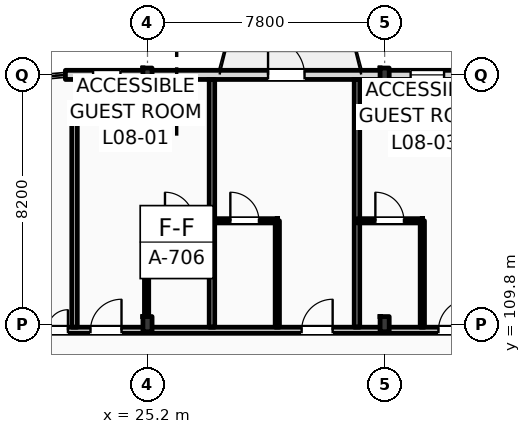
"""IFC4 building model, lengths in metres.
Left out: names, types, materials, properties, quantities, classifications, styles, units other than length and angle.
Written with IfcOpenShell. Run it as: python <this file> out.ifc"""

import sys

from ifc_helpers import new_model, si_unit, direction, frame, frame_2d, origin, origin_2d, place, context, subcontext, project, spatial, rectangle, i_section, extrude, element, fill, save


model = new_model("IFC4")
c1 = context("Model", 3, precision=1e-05, world=origin(), true_north=direction((0.0, 1.0)))
c2 = subcontext(c1, "Body", "Model", "MODEL_VIEW")
j1 = project(units=[si_unit("LENGTHUNIT", "METRE"), si_unit("PLANEANGLEUNIT", "RADIAN")], contexts=[c1])
p1 = place(None, origin())
s1 = spatial("IfcSite", under=j1, at=p1, CompositionType="ELEMENT")
p2 = place(p1, origin())
s2 = spatial("IfcBuilding", under=s1, at=p2, CompositionType="ELEMENT")
p3 = place(p2, frame((0.0, 0.0, 35.4)))
s3 = spatial("IfcBuildingStorey", under=s2, at=p3, CompositionType="ELEMENT", Elevation=35.4)
p4 = place(p3, frame((25.2, 109.8, 0.0), z_axis=(0.0, 0.0, 1.0), x_axis=(1.0, 0.0, 0.0)))
e1 = element("IfcColumn", 1, at=p4, inside=s3, PredefinedType="COLUMN", context=c2, shape_type="SweptSolid", body=[
    extrude(i_section(OverallWidth=0.3, OverallDepth=0.5, WebThickness=0.014, FlangeThickness=0.028, FilletRadius=0.027, at=origin_2d()), origin(), (0.0, 0.0, 1.0), 3.6),
])
p5 = place(p3, frame((25.2, 118.0, 0.0), z_axis=(0.0, 0.0, 1.0), x_axis=(1.0, 0.0, 0.0)))
e2 = element("IfcColumn", 2, at=p5, inside=s3, PredefinedType="COLUMN", context=c2, shape_type="SweptSolid", body=[
    extrude(i_section(OverallWidth=0.3, OverallDepth=0.45, WebThickness=0.014, FlangeThickness=0.026, FilletRadius=0.027, at=origin_2d()), origin(), (0.0, 0.0, 1.0), 3.6),
])
p6 = place(p3, frame((33.0, 109.8, 0.0), z_axis=(0.0, 0.0, 1.0), x_axis=(1.0, 0.0, 0.0)))
e3 = element("IfcColumn", 3, at=p6, inside=s3, PredefinedType="COLUMN", context=c2, shape_type="SweptSolid", body=[
    extrude(i_section(OverallWidth=0.3, OverallDepth=0.5, WebThickness=0.014, FlangeThickness=0.028, FilletRadius=0.027, at=origin_2d()), origin(), (0.0, 0.0, 1.0), 3.6),
])
p7 = place(p3, frame((33.0, 118.0, 0.0), z_axis=(0.0, 0.0, 1.0), x_axis=(1.0, 0.0, 0.0)))
e4 = element("IfcColumn", 4, at=p7, inside=s3, PredefinedType="COLUMN", context=c2, shape_type="SweptSolid", body=[
    extrude(i_section(OverallWidth=0.3, OverallDepth=0.45, WebThickness=0.014, FlangeThickness=0.026, FilletRadius=0.027, at=origin_2d()), origin(), (0.0, 0.0, 1.0), 3.6),
])
p8 = place(p3, frame((22.5, 118.0, 0.0), z_axis=(0.0, 0.0, 1.0), x_axis=(1.0, 0.0, 0.0)))
e5 = element("IfcWall", 5, at=p8, inside=s3, PredefinedType="STANDARD", context=c2, shape_type="SweptSolid", body=[
    extrude(rectangle(XDim=72.9, YDim=0.3, at=frame_2d((36.45, 0.0))), origin(), (0.0, 0.0, 1.0), 2.92),
])
p9 = place(p8, frame((0.91, 0.0, 0.9)))
e6 = element("IfcOpeningElement", 6, at=p9, cuts=e5, PredefinedType="OPENING", context=c2, shape_type="SweptSolid", body=[
    extrude(rectangle(XDim=0.9, YDim=1.84, at=frame_2d((0.45, 0.92))), frame((0.0, 0.16, 0.0), z_axis=(0.0, -1.0, 0.0), x_axis=(1.0, 0.0, 0.0)), (0.0, 0.0, 1.0), 0.32),
])
p10 = place(p8, frame((6.665, 0.0, 0.0)))
e7 = element("IfcOpeningElement", 7, at=p10, cuts=e5, PredefinedType="OPENING", context=c2, shape_type="SweptSolid", body=[
    extrude(rectangle(XDim=1.2, YDim=2.25, at=frame_2d((0.6, 1.125))), frame((0.0, 0.16, 0.0), z_axis=(0.0, -1.0, 0.0), x_axis=(1.0, 0.0, 0.0)), (0.0, 0.0, 1.0), 0.32),
])
p11 = place(p8, frame((11.355, 0.0, 0.9)))
e8 = element("IfcOpeningElement", 8, at=p11, cuts=e5, PredefinedType="OPENING", context=c2, shape_type="SweptSolid", body=[
    extrude(rectangle(XDim=1.1, YDim=1.5, at=frame_2d((0.55, 0.75))), frame((0.0, 0.16, 0.0), z_axis=(0.0, -1.0, 0.0), x_axis=(1.0, 0.0, 0.0)), (0.0, 0.0, 1.0), 0.32),
])
p12 = place(p8, frame((15.58, 0.0, 0.9)))
e9 = element("IfcOpeningElement", 9, at=p12, cuts=e5, PredefinedType="OPENING", context=c2, shape_type="SweptSolid", body=[
    extrude(rectangle(XDim=1.25, YDim=1.6, at=frame_2d((0.625, 0.8))), frame((0.0, 0.16, 0.0), z_axis=(0.0, -1.0, 0.0), x_axis=(1.0, 0.0, 0.0)), (0.0, 0.0, 1.0), 0.32),
])
p13 = place(p8, frame((21.08, 0.0, 0.0)))
e10 = element("IfcOpeningElement", 10, at=p13, cuts=e5, PredefinedType="OPENING", context=c2, shape_type="SweptSolid", body=[
    extrude(rectangle(XDim=1.2, YDim=2.25, at=frame_2d((0.6, 1.125))), frame((0.0, 0.16, 0.0), z_axis=(0.0, -1.0, 0.0), x_axis=(1.0, 0.0, 0.0)), (0.0, 0.0, 1.0), 0.32),
])
p14 = place(p8, frame((23.54, 0.0, 0.0)))
e11 = element("IfcOpeningElement", 11, at=p14, cuts=e5, PredefinedType="OPENING", context=c2, shape_type="SweptSolid", body=[
    extrude(rectangle(XDim=1.2, YDim=2.25, at=frame_2d((0.6, 1.125))), frame((0.0, 0.16, 0.0), z_axis=(0.0, -1.0, 0.0), x_axis=(1.0, 0.0, 0.0)), (0.0, 0.0, 1.0), 0.32),
])
p15 = place(p8, frame((28.83, 0.0, 0.9)))
e12 = element("IfcOpeningElement", 12, at=p15, cuts=e5, PredefinedType="OPENING", context=c2, shape_type="SweptSolid", body=[
    extrude(rectangle(XDim=1.75, YDim=1.84, at=frame_2d((0.875, 0.92))), frame((0.0, 0.16, 0.0), z_axis=(0.0, -1.0, 0.0), x_axis=(1.0, 0.0, 0.0)), (0.0, 0.0, 1.0), 0.32),
])
p16 = place(p8, frame((34.805, 0.0, 0.9)))
e13 = element("IfcOpeningElement", 13, at=p16, cuts=e5, PredefinedType="OPENING", context=c2, shape_type="SweptSolid", body=[
    extrude(rectangle(XDim=1.35, YDim=1.84, at=frame_2d((0.675, 0.92))), frame((0.0, 0.16, 0.0), z_axis=(0.0, -1.0, 0.0), x_axis=(1.0, 0.0, 0.0)), (0.0, 0.0, 1.0), 0.32),
])
p17 = place(p8, frame((38.105, 0.0, 0.0)))
e14 = element("IfcOpeningElement", 14, at=p17, cuts=e5, PredefinedType="OPENING", context=c2, shape_type="SweptSolid", body=[
    extrude(rectangle(XDim=1.2, YDim=2.25, at=frame_2d((0.6, 1.125))), frame((0.0, 0.16, 0.0), z_axis=(0.0, -1.0, 0.0), x_axis=(1.0, 0.0, 0.0)), (0.0, 0.0, 1.0), 0.32),
])
p18 = place(p8, frame((42.505, 0.0, 0.9)))
e15 = element("IfcOpeningElement", 15, at=p18, cuts=e5, PredefinedType="OPENING", context=c2, shape_type="SweptSolid", body=[
    extrude(rectangle(XDim=2.6, YDim=1.84, at=frame_2d((1.3, 0.92))), frame((0.0, 0.16, 0.0), z_axis=(0.0, -1.0, 0.0), x_axis=(1.0, 0.0, 0.0)), (0.0, 0.0, 1.0), 0.32),
])
p19 = place(p8, frame((46.2, 0.0, 0.9)))
e16 = element("IfcOpeningElement", 16, at=p19, cuts=e5, PredefinedType="OPENING", context=c2, shape_type="SweptSolid", body=[
    extrude(rectangle(XDim=1.8, YDim=1.84, at=frame_2d((0.9, 0.92))), frame((0.0, 0.16, 0.0), z_axis=(0.0, -1.0, 0.0), x_axis=(1.0, 0.0, 0.0)), (0.0, 0.0, 1.0), 0.32),
])
p20 = place(p8, frame((52.565, 0.0, 0.0)))
e17 = element("IfcOpeningElement", 17, at=p20, cuts=e5, PredefinedType="OPENING", context=c2, shape_type="SweptSolid", body=[
    extrude(rectangle(XDim=1.2, YDim=2.25, at=frame_2d((0.6, 1.125))), frame((0.0, 0.16, 0.0), z_axis=(0.0, -1.0, 0.0), x_axis=(1.0, 0.0, 0.0)), (0.0, 0.0, 1.0), 0.32),
])
p21 = place(p8, frame((55.305, 0.0, 0.9)))
e18 = element("IfcOpeningElement", 18, at=p21, cuts=e5, PredefinedType="OPENING", context=c2, shape_type="SweptSolid", body=[
    extrude(rectangle(XDim=1.2, YDim=1.8, at=frame_2d((0.6, 0.9))), frame((0.0, 0.16, 0.0), z_axis=(0.0, -1.0, 0.0), x_axis=(1.0, 0.0, 0.0)), (0.0, 0.0, 1.0), 0.32),
])
p22 = place(p8, frame((60.53, 0.0, 0.9)))
e19 = element("IfcOpeningElement", 19, at=p22, cuts=e5, PredefinedType="OPENING", context=c2, shape_type="SweptSolid", body=[
    extrude(rectangle(XDim=1.35, YDim=1.84, at=frame_2d((0.675, 0.92))), frame((0.0, 0.16, 0.0), z_axis=(0.0, -1.0, 0.0), x_axis=(1.0, 0.0, 0.0)), (0.0, 0.0, 1.0), 0.32),
])
p23 = place(p8, frame((65.955, 0.0, 0.9)))
e20 = element("IfcOpeningElement", 20, at=p23, cuts=e5, PredefinedType="OPENING", context=c2, shape_type="SweptSolid", body=[
    extrude(rectangle(XDim=1.35, YDim=1.84, at=frame_2d((0.675, 0.92))), frame((0.0, 0.16, 0.0), z_axis=(0.0, -1.0, 0.0), x_axis=(1.0, 0.0, 0.0)), (0.0, 0.0, 1.0), 0.32),
])
p24 = place(p8, frame((69.335, 0.0, 0.9)))
e21 = element("IfcOpeningElement", 21, at=p24, cuts=e5, PredefinedType="OPENING", context=c2, shape_type="SweptSolid", body=[
    extrude(rectangle(XDim=1.65, YDim=1.84, at=frame_2d((0.825, 0.92))), frame((0.0, 0.16, 0.0), z_axis=(0.0, -1.0, 0.0), x_axis=(1.0, 0.0, 0.0)), (0.0, 0.0, 1.0), 0.32),
])
p25 = place(p3, frame((10.65, 109.6, 0.0), z_axis=(0.0, 0.0, 1.0), x_axis=(1.0, 0.0, 0.0)))
e22 = element("IfcWall", 22, at=p25, inside=s3, PredefinedType="PARTITIONING", context=c2, shape_type="SweptSolid", body=[
    extrude(rectangle(XDim=84.61, YDim=0.2, at=frame_2d((42.305, 0.0))), origin(), (0.0, 0.0, 1.0), 2.82),
])
p26 = place(p25, frame((12.675, 0.0, 0.0)))
e23 = element("IfcOpeningElement", 23, at=p26, cuts=e22, PredefinedType="OPENING", context=c2, shape_type="SweptSolid", body=[
    extrude(rectangle(XDim=1.02, YDim=2.2, at=frame_2d((0.51, 1.1))), frame((0.0, 0.11, 0.0), z_axis=(0.0, -1.0, 0.0), x_axis=(1.0, 0.0, 0.0)), (0.0, 0.0, 1.0), 0.22),
])
p27 = place(p25, frame((19.62, 0.0, 0.0)))
e24 = element("IfcOpeningElement", 24, at=p27, cuts=e22, PredefinedType="OPENING", context=c2, shape_type="SweptSolid", body=[
    extrude(rectangle(XDim=1.02, YDim=2.2, at=frame_2d((0.51, 1.1))), frame((0.0, 0.11, 0.0), z_axis=(0.0, -1.0, 0.0), x_axis=(1.0, 0.0, 0.0)), (0.0, 0.0, 1.0), 0.22),
])
p28 = place(p25, frame((24.12, 0.0, 0.0)))
e25 = element("IfcOpeningElement", 25, at=p28, cuts=e22, PredefinedType="OPENING", context=c2, shape_type="SweptSolid", body=[
    extrude(rectangle(XDim=1.02, YDim=2.2, at=frame_2d((0.51, 1.1))), frame((0.0, 0.11, 0.0), z_axis=(0.0, -1.0, 0.0), x_axis=(1.0, 0.0, 0.0)), (0.0, 0.0, 1.0), 0.22),
])
p29 = place(p25, frame((26.47, 0.0, 0.0)))
e26 = element("IfcOpeningElement", 26, at=p29, cuts=e22, PredefinedType="OPENING", context=c2, shape_type="SweptSolid", body=[
    extrude(rectangle(XDim=1.02, YDim=2.2, at=frame_2d((0.51, 1.1))), frame((0.0, 0.11, 0.0), z_axis=(0.0, -1.0, 0.0), x_axis=(1.0, 0.0, 0.0)), (0.0, 0.0, 1.0), 0.22),
])
p30 = place(p25, frame((33.15, 0.0, 0.0)))
e27 = element("IfcOpeningElement", 27, at=p30, cuts=e22, PredefinedType="OPENING", context=c2, shape_type="SweptSolid", body=[
    extrude(rectangle(XDim=0.96, YDim=2.2, at=frame_2d((0.48, 1.1))), frame((0.0, 0.11, 0.0), z_axis=(0.0, -1.0, 0.0), x_axis=(1.0, 0.0, 0.0)), (0.0, 0.0, 1.0), 0.22),
])
p31 = place(p25, frame((35.5, 0.0, 0.0)))
e28 = element("IfcOpeningElement", 28, at=p31, cuts=e22, PredefinedType="OPENING", context=c2, shape_type="SweptSolid", body=[
    extrude(rectangle(XDim=0.96, YDim=2.2, at=frame_2d((0.48, 1.1))), frame((0.0, 0.11, 0.0), z_axis=(0.0, -1.0, 0.0), x_axis=(1.0, 0.0, 0.0)), (0.0, 0.0, 1.0), 0.22),
])
p32 = place(p25, frame((42.15, 0.0, 0.0)))
e29 = element("IfcOpeningElement", 29, at=p32, cuts=e22, PredefinedType="OPENING", context=c2, shape_type="SweptSolid", body=[
    extrude(rectangle(XDim=0.96, YDim=2.2, at=frame_2d((0.48, 1.1))), frame((0.0, 0.11, 0.0), z_axis=(0.0, -1.0, 0.0), x_axis=(1.0, 0.0, 0.0)), (0.0, 0.0, 1.0), 0.22),
])
p33 = place(p25, frame((47.15, 0.0, 0.0)))
e30 = element("IfcOpeningElement", 30, at=p33, cuts=e22, PredefinedType="OPENING", context=c2, shape_type="SweptSolid", body=[
    extrude(rectangle(XDim=0.96, YDim=2.2, at=frame_2d((0.48, 1.1))), frame((0.0, 0.11, 0.0), z_axis=(0.0, -1.0, 0.0), x_axis=(1.0, 0.0, 0.0)), (0.0, 0.0, 1.0), 0.22),
])
p34 = place(p25, frame((51.15, 0.0, 0.0)))
e31 = element("IfcOpeningElement", 31, at=p34, cuts=e22, PredefinedType="OPENING", context=c2, shape_type="SweptSolid", body=[
    extrude(rectangle(XDim=0.96, YDim=2.2, at=frame_2d((0.48, 1.1))), frame((0.0, 0.11, 0.0), z_axis=(0.0, -1.0, 0.0), x_axis=(1.0, 0.0, 0.0)), (0.0, 0.0, 1.0), 0.22),
])
p35 = place(p25, frame((55.65, 0.0, 0.0)))
e32 = element("IfcOpeningElement", 32, at=p35, cuts=e22, PredefinedType="OPENING", context=c2, shape_type="SweptSolid", body=[
    extrude(rectangle(XDim=0.96, YDim=2.2, at=frame_2d((0.48, 1.1))), frame((0.0, 0.11, 0.0), z_axis=(0.0, -1.0, 0.0), x_axis=(1.0, 0.0, 0.0)), (0.0, 0.0, 1.0), 0.22),
])
p36 = place(p25, frame((58.0, 0.0, 0.0)))
e33 = element("IfcOpeningElement", 33, at=p36, cuts=e22, PredefinedType="OPENING", context=c2, shape_type="SweptSolid", body=[
    extrude(rectangle(XDim=0.96, YDim=2.2, at=frame_2d((0.48, 1.1))), frame((0.0, 0.11, 0.0), z_axis=(0.0, -1.0, 0.0), x_axis=(1.0, 0.0, 0.0)), (0.0, 0.0, 1.0), 0.22),
])
p37 = place(p25, frame((64.65, 0.0, 0.0)))
e34 = element("IfcOpeningElement", 34, at=p37, cuts=e22, PredefinedType="OPENING", context=c2, shape_type="SweptSolid", body=[
    extrude(rectangle(XDim=0.96, YDim=2.2, at=frame_2d((0.48, 1.1))), frame((0.0, 0.11, 0.0), z_axis=(0.0, -1.0, 0.0), x_axis=(1.0, 0.0, 0.0)), (0.0, 0.0, 1.0), 0.22),
])
p38 = place(p25, frame((66.75, 0.0, 0.0)))
e35 = element("IfcOpeningElement", 35, at=p38, cuts=e22, PredefinedType="OPENING", context=c2, shape_type="SweptSolid", body=[
    extrude(rectangle(XDim=0.96, YDim=2.2, at=frame_2d((0.48, 1.1))), frame((0.0, 0.11, 0.0), z_axis=(0.0, -1.0, 0.0), x_axis=(1.0, 0.0, 0.0)), (0.0, 0.0, 1.0), 0.22),
])
p39 = place(p25, frame((73.65, 0.0, 0.0)))
e36 = element("IfcOpeningElement", 36, at=p39, cuts=e22, PredefinedType="OPENING", context=c2, shape_type="SweptSolid", body=[
    extrude(rectangle(XDim=0.96, YDim=2.2, at=frame_2d((0.48, 1.1))), frame((0.0, 0.11, 0.0), z_axis=(0.0, -1.0, 0.0), x_axis=(1.0, 0.0, 0.0)), (0.0, 0.0, 1.0), 0.22),
])
p40 = place(p25, frame((78.4, 0.0, 0.0)))
e37 = element("IfcOpeningElement", 37, at=p40, cuts=e22, PredefinedType="OPENING", context=c2, shape_type="SweptSolid", body=[
    extrude(rectangle(XDim=0.96, YDim=2.2, at=frame_2d((0.48, 1.1))), frame((0.0, 0.11, 0.0), z_axis=(0.0, -1.0, 0.0), x_axis=(1.0, 0.0, 0.0)), (0.0, 0.0, 1.0), 0.22),
])
p41 = place(p25, frame((80.455, 0.0, 0.0)))
e38 = element("IfcOpeningElement", 38, at=p41, cuts=e22, PredefinedType="OPENING", context=c2, shape_type="SweptSolid", body=[
    extrude(rectangle(XDim=0.96, YDim=2.2, at=frame_2d((0.48, 1.1))), frame((0.0, 0.11, 0.0), z_axis=(0.0, -1.0, 0.0), x_axis=(1.0, 0.0, 0.0)), (0.0, 0.0, 1.0), 0.22),
])
p42 = place(p25, frame((2.716, 0.0, 0.0)))
e39 = element("IfcOpeningElement", 39, at=p42, cuts=e22, PredefinedType="OPENING", context=c2, shape_type="SweptSolid", body=[
    extrude(rectangle(XDim=1.35, YDim=2.25, at=frame_2d((0.675, 1.125))), frame((0.0, 0.11, 0.0), z_axis=(0.0, -1.0, 0.0), x_axis=(1.0, 0.0, 0.0)), (0.0, 0.0, 1.0), 0.22),
])
p43 = place(p25, frame((6.65, 0.0, 0.0)))
e40 = element("IfcOpeningElement", 40, at=p43, cuts=e22, PredefinedType="OPENING", context=c2, shape_type="SweptSolid", body=[
    extrude(rectangle(XDim=1.35, YDim=2.25, at=frame_2d((0.675, 1.125))), frame((0.0, 0.11, 0.0), z_axis=(0.0, -1.0, 0.0), x_axis=(1.0, 0.0, 0.0)), (0.0, 0.0, 1.0), 0.22),
])
p44 = place(p25, frame((10.583, 0.0, 0.0)))
e41 = element("IfcOpeningElement", 41, at=p44, cuts=e22, PredefinedType="OPENING", context=c2, shape_type="SweptSolid", body=[
    extrude(rectangle(XDim=1.35, YDim=2.25, at=frame_2d((0.675, 1.125))), frame((0.0, 0.11, 0.0), z_axis=(0.0, -1.0, 0.0), x_axis=(1.0, 0.0, 0.0)), (0.0, 0.0, 1.0), 0.22),
])
p45 = place(p3, frame((27.32, 109.7, 0.0), z_axis=(0.0, 0.0, 1.0), x_axis=(0.0, 1.0, 0.0)))
e42 = element("IfcWall", 42, at=p45, inside=s3, PredefinedType="PARTITIONING", context=c2, shape_type="SweptSolid", body=[
    extrude(rectangle(XDim=8.15, YDim=0.18, at=frame_2d((4.075, 0.0))), origin(), (0.0, 0.0, 1.0), 3.38),
])
p46 = place(p3, frame((25.17, 109.7, 0.0), z_axis=(0.0, 0.0, 1.0), x_axis=(0.0, 1.0, 0.0)))
e43 = element("IfcWall", 43, at=p46, inside=s3, PredefinedType="PARTITIONING", context=c2, shape_type="SweptSolid", body=[
    extrude(rectangle(XDim=3.5, YDim=0.14, at=frame_2d((1.75, 0.0))), origin(), (0.0, 0.0, 1.0), 3.01),
])
p47 = place(p3, frame((25.17, 113.2, 0.0), z_axis=(0.0, 0.0, 1.0), x_axis=(1.0, 0.0, 0.0)))
e44 = element("IfcWall", 44, at=p47, inside=s3, PredefinedType="PARTITIONING", context=c2, shape_type="SweptSolid", body=[
    extrude(rectangle(XDim=2.15, YDim=0.14, at=frame_2d((1.075, 0.0))), origin(), (0.0, 0.0, 1.0), 3.38),
])
p48 = place(p47, frame((0.605, 0.0, 0.0)))
e45 = element("IfcOpeningElement", 45, at=p48, cuts=e44, PredefinedType="OPENING", context=c2, shape_type="SweptSolid", body=[
    extrude(rectangle(XDim=0.94, YDim=2.15, at=frame_2d((0.47, 1.075))), frame((0.0, 0.08, 0.0), z_axis=(0.0, -1.0, 0.0), x_axis=(1.0, 0.0, 0.0)), (0.0, 0.0, 1.0), 0.16),
])
p49 = place(p3, frame((32.09, 109.7, 0.0), z_axis=(0.0, 0.0, 1.0), x_axis=(0.0, 1.0, 0.0)))
e46 = element("IfcWall", 46, at=p49, inside=s3, PredefinedType="PARTITIONING", context=c2, shape_type="SweptSolid", body=[
    extrude(rectangle(XDim=8.15, YDim=0.18, at=frame_2d((4.075, 0.0))), origin(), (0.0, 0.0, 1.0), 3.38),
])
p50 = place(p3, frame((29.47, 109.7, 0.0), z_axis=(0.0, 0.0, 1.0), x_axis=(0.0, 1.0, 0.0)))
e47 = element("IfcWall", 47, at=p50, inside=s3, PredefinedType="PARTITIONING", context=c2, shape_type="SweptSolid", body=[
    extrude(rectangle(XDim=3.5, YDim=0.14, at=frame_2d((1.75, 0.0))), origin(), (0.0, 0.0, 1.0), 3.38),
])
p51 = place(p3, frame((27.32, 113.2, 0.0), z_axis=(0.0, 0.0, 1.0), x_axis=(1.0, 0.0, 0.0)))
e48 = element("IfcWall", 48, at=p51, inside=s3, PredefinedType="PARTITIONING", context=c2, shape_type="SweptSolid", body=[
    extrude(rectangle(XDim=2.15, YDim=0.14, at=frame_2d((1.075, 0.0))), origin(), (0.0, 0.0, 1.0), 3.38),
])
p52 = place(p51, frame((0.605, 0.0, 0.0)))
e49 = element("IfcOpeningElement", 49, at=p52, cuts=e48, PredefinedType="OPENING", context=c2, shape_type="SweptSolid", body=[
    extrude(rectangle(XDim=0.94, YDim=2.15, at=frame_2d((0.47, 1.075))), frame((0.0, 0.08, 0.0), z_axis=(0.0, -1.0, 0.0), x_axis=(1.0, 0.0, 0.0)), (0.0, 0.0, 1.0), 0.16),
])
p53 = place(p3, frame((34.24, 109.7, 0.0), z_axis=(0.0, 0.0, 1.0), x_axis=(0.0, 1.0, 0.0)))
e50 = element("IfcWall", 50, at=p53, inside=s3, PredefinedType="PARTITIONING", context=c2, shape_type="SweptSolid", body=[
    extrude(rectangle(XDim=3.5, YDim=0.14, at=frame_2d((1.75, 0.0))), origin(), (0.0, 0.0, 1.0), 3.38),
])
p54 = place(p3, frame((32.09, 113.2, 0.0), z_axis=(0.0, 0.0, 1.0), x_axis=(1.0, 0.0, 0.0)))
e51 = element("IfcWall", 51, at=p54, inside=s3, PredefinedType="PARTITIONING", context=c2, shape_type="SweptSolid", body=[
    extrude(rectangle(XDim=2.15, YDim=0.14, at=frame_2d((1.075, 0.0))), origin(), (0.0, 0.0, 1.0), 3.38),
])
p55 = place(p54, frame((0.605, 0.0, 0.0)))
e52 = element("IfcOpeningElement", 52, at=p55, cuts=e51, PredefinedType="OPENING", context=c2, shape_type="SweptSolid", body=[
    extrude(rectangle(XDim=0.94, YDim=2.15, at=frame_2d((0.47, 1.075))), frame((0.0, 0.08, 0.0), z_axis=(0.0, -1.0, 0.0), x_axis=(1.0, 0.0, 0.0)), (0.0, 0.0, 1.0), 0.16),
])
p56 = place(p3, frame((22.8, 109.7, 0.0), z_axis=(0.0, 0.0, 1.0), x_axis=(0.0, 1.0, 0.0)))
e53 = element("IfcWall", 53, at=p56, inside=s3, PredefinedType="PARTITIONING", context=c2, shape_type="SweptSolid", body=[
    extrude(rectangle(XDim=7.2, YDim=0.18, at=frame_2d((3.6, 0.0))), origin(), (0.0, 0.0, 1.0), 3.38),
])
p57 = place(p9, origin())
e54 = element("IfcWindow", 54, at=p57, inside=s3, PartitioningType="DOUBLE_PANEL_VERTICAL", PredefinedType="WINDOW", context=c2, shape_type="SweptSolid", body=[
    extrude(rectangle(XDim=0.9, YDim=1.84, at=frame_2d((0.45, 0.92))), frame((0.0, 0.03, 0.0), z_axis=(0.0, -1.0, 0.0), x_axis=(1.0, 0.0, 0.0)), (0.0, 0.0, 1.0), 0.06),
])
fill(e6, e54)
p58 = place(p10, origin())
e55 = element("IfcDoor", 55, at=p58, inside=s3, OperationType="SINGLE_SWING_LEFT", PredefinedType="DOOR", context=c2, shape_type="SweptSolid", body=[
    extrude(rectangle(XDim=1.2, YDim=2.25, at=frame_2d((0.6, 1.125))), frame((0.0, 0.025, 0.0), z_axis=(0.0, -1.0, 0.0), x_axis=(1.0, 0.0, 0.0)), (0.0, 0.0, 1.0), 0.05),
])
fill(e7, e55)
p59 = place(p11, origin())
e56 = element("IfcWindow", 56, at=p59, inside=s3, PartitioningType="DOUBLE_PANEL_VERTICAL", PredefinedType="WINDOW", context=c2, shape_type="SweptSolid", body=[
    extrude(rectangle(XDim=1.1, YDim=1.5, at=frame_2d((0.55, 0.75))), frame((0.0, 0.03, 0.0), z_axis=(0.0, -1.0, 0.0), x_axis=(1.0, 0.0, 0.0)), (0.0, 0.0, 1.0), 0.06),
])
fill(e8, e56)
p60 = place(p26, origin())
e57 = element("IfcDoor", 57, at=p60, inside=s3, OperationType="SINGLE_SWING_RIGHT", PredefinedType="DOOR", context=c2, shape_type="SweptSolid", body=[
    extrude(rectangle(XDim=1.02, YDim=2.2, at=frame_2d((0.51, 1.1))), frame((0.0, 0.025, 0.0), z_axis=(0.0, -1.0, 0.0), x_axis=(1.0, 0.0, 0.0)), (0.0, 0.0, 1.0), 0.05),
])
fill(e23, e57)
p61 = place(p48, origin())
e58 = element("IfcDoor", 58, at=p61, inside=s3, OperationType="SINGLE_SWING_LEFT", PredefinedType="DOOR", context=c2, shape_type="SweptSolid", body=[
    extrude(rectangle(XDim=0.94, YDim=2.15, at=frame_2d((0.47, 1.075))), frame((0.0, 0.025, 0.0), z_axis=(0.0, -1.0, 0.0), x_axis=(1.0, 0.0, 0.0)), (0.0, 0.0, 1.0), 0.05),
])
fill(e45, e58)
p62 = place(p27, origin())
e59 = element("IfcDoor", 59, at=p62, inside=s3, OperationType="SINGLE_SWING_RIGHT", PredefinedType="DOOR", context=c2, shape_type="SweptSolid", body=[
    extrude(rectangle(XDim=1.02, YDim=2.2, at=frame_2d((0.51, 1.1))), frame((0.0, 0.025, 0.0), z_axis=(0.0, -1.0, 0.0), x_axis=(1.0, 0.0, 0.0)), (0.0, 0.0, 1.0), 0.05),
])
fill(e24, e59)
p63 = place(p52, origin())
e60 = element("IfcDoor", 60, at=p63, inside=s3, OperationType="SINGLE_SWING_LEFT", PredefinedType="DOOR", context=c2, shape_type="SweptSolid", body=[
    extrude(rectangle(XDim=0.94, YDim=2.15, at=frame_2d((0.47, 1.075))), frame((0.0, 0.025, 0.0), z_axis=(0.0, -1.0, 0.0), x_axis=(1.0, 0.0, 0.0)), (0.0, 0.0, 1.0), 0.05),
])
fill(e49, e60)
p64 = place(p28, origin())
e61 = element("IfcDoor", 61, at=p64, inside=s3, OperationType="SINGLE_SWING_RIGHT", PredefinedType="DOOR", context=c2, shape_type="SweptSolid", body=[
    extrude(rectangle(XDim=1.02, YDim=2.2, at=frame_2d((0.51, 1.1))), frame((0.0, 0.025, 0.0), z_axis=(0.0, -1.0, 0.0), x_axis=(1.0, 0.0, 0.0)), (0.0, 0.0, 1.0), 0.05),
])
fill(e25, e61)
p65 = place(p55, origin())
e62 = element("IfcDoor", 62, at=p65, inside=s3, OperationType="SINGLE_SWING_LEFT", PredefinedType="DOOR", context=c2, shape_type="SweptSolid", body=[
    extrude(rectangle(XDim=0.94, YDim=2.15, at=frame_2d((0.47, 1.075))), frame((0.0, 0.025, 0.0), z_axis=(0.0, -1.0, 0.0), x_axis=(1.0, 0.0, 0.0)), (0.0, 0.0, 1.0), 0.05),
])
fill(e52, e62)
p66 = place(p44, origin())
e63 = element("IfcDoor", 63, at=p66, inside=s3, OperationType="DOUBLE_SWING_LEFT", PredefinedType="DOOR", context=c2, shape_type="SweptSolid", body=[
    extrude(rectangle(XDim=1.35, YDim=2.25, at=frame_2d((0.675, 1.125))), frame((0.0, 0.025, 0.0), z_axis=(0.0, -1.0, 0.0), x_axis=(1.0, 0.0, 0.0)), (0.0, 0.0, 1.0), 0.05),
])
fill(e41, e63)
save(model, sys.argv[1])
